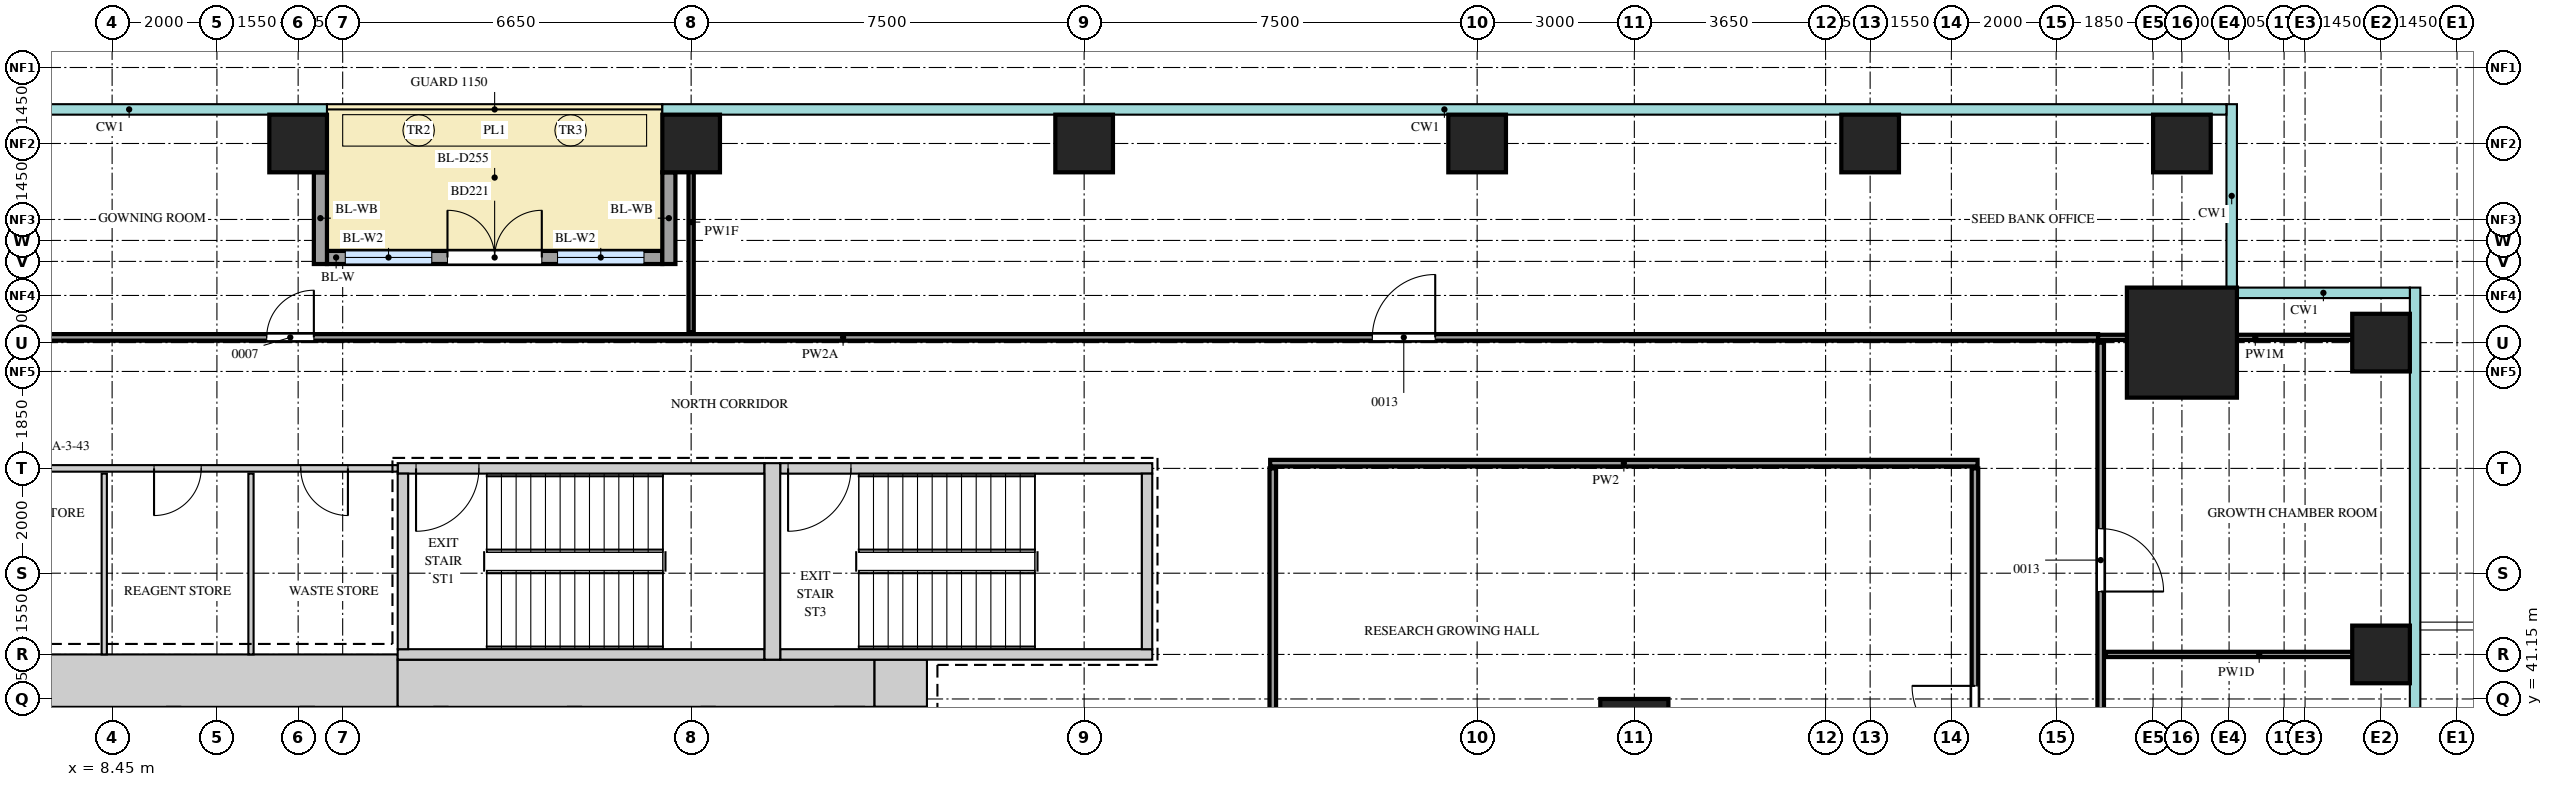
"""IFC4 building model, lengths in metres.
Left out: names, types, materials, properties, quantities, classifications, styles, units other than length and angle.
Written with IfcOpenShell. Run it as: python <this file> out.ifc"""

import sys

from ifc_helpers import new_model, si_unit, direction, frame, frame_2d, origin, origin_2d, place, context, subcontext, project, spatial, rectangle, extrude, source, transform, mapped, element, fill, save


model = new_model("IFC4")
c1 = context("Model", 3, precision=1e-05, world=origin(), true_north=direction((0.0, 1.0)))
c2 = subcontext(c1, "Body", "Model", "MODEL_VIEW")
j1 = project(units=[si_unit("LENGTHUNIT", "METRE"), si_unit("PLANEANGLEUNIT", "RADIAN")], contexts=[c1])
p1 = place(None, origin())
s1 = spatial("IfcSite", under=j1, at=p1, CompositionType="ELEMENT")
p2 = place(p1, origin())
s2 = spatial("IfcBuilding", under=s1, at=p2, CompositionType="ELEMENT")
p3 = place(p2, frame((0.0, 0.0, 105.9)))
s3 = spatial("IfcBuildingStorey", under=s2, at=p3, CompositionType="ELEMENT", Elevation=105.9)
m1 = source(origin(), c2, "Body", "SweptSolid", [
    extrude(rectangle(XDim=6.9, YDim=1.0, at=frame_2d((3.45, 0.0))), origin(), (0.0, 0.0, 1.0), 4.1),
])
p4 = place(p3, frame((7.0, 41.5, 0.0), z_axis=(0.0, 0.0, 1.0), x_axis=(1.0, 0.0, 0.0)))
e1 = element("IfcWall", 1, at=p4, inside=s3, PredefinedType="SHEAR", context=c2, shape_type="MappedRepresentation", body=[
    mapped(m1, transform((0.0, 0.0, 0.0))),
])
m2 = source(origin(), c2, "Body", "SweptSolid", [
    extrude(rectangle(XDim=9.1, YDim=0.9, at=frame_2d((4.55, 0.0))), origin(), (0.0, 0.0, 1.0), 4.1),
])
p5 = place(p3, frame((13.9, 41.45, 0.0), z_axis=(0.0, 0.0, 1.0), x_axis=(1.0, 0.0, 0.0)))
e2 = element("IfcWall", 2, at=p5, inside=s3, PredefinedType="SHEAR", context=c2, shape_type="MappedRepresentation", body=[
    mapped(m2, transform((0.0, 0.0, 0.0))),
])
m3 = source(origin(), c2, "Body", "SweptSolid", [
    extrude(rectangle(XDim=1.0, YDim=0.9, at=frame_2d((0.5, 0.0))), origin(), (0.0, 0.0, 1.0), 4.1),
])
p6 = place(p3, frame((23.0, 41.45, 0.0), z_axis=(0.0, 0.0, 1.0), x_axis=(1.0, 0.0, 0.0)))
e3 = element("IfcWall", 3, at=p6, inside=s3, PredefinedType="SHEAR", context=c2, shape_type="MappedRepresentation", body=[
    mapped(m3, transform((0.0, 0.0, 0.0))),
])
m4 = source(origin(), c2, "Body", "SweptSolid", [
    extrude(rectangle(XDim=7.0, YDim=0.2, at=frame_2d((3.5, 0.0))), origin(), (0.0, 0.0, 1.0), 4.1),
])
p7 = place(p3, frame((13.9, 45.55, 0.0), z_axis=(0.0, 0.0, 1.0), x_axis=(1.0, 0.0, 0.0)))
e4 = element("IfcWall", 4, at=p7, inside=s3, PredefinedType="SHEAR", context=c2, shape_type="MappedRepresentation", body=[
    mapped(m4, transform((0.0, 0.0, 0.0))),
])
m5 = source(origin(), c2, "Body", "SweptSolid", [
    extrude(rectangle(XDim=1.2, YDim=2.1, at=frame_2d((0.6, 1.05))), frame((0.0, 0.11, 0.0), z_axis=(0.0, -1.0, 0.0), x_axis=(1.0, 0.0, 0.0)), (0.0, 0.0, 1.0), 0.22),
])
p8 = place(p7, frame((0.35, 0.0, 0.0)))
e5 = element("IfcOpeningElement", 5, at=p8, cuts=e4, PredefinedType="OPENING", context=c2, shape_type="MappedRepresentation", body=[
    mapped(m5, transform((0.0, 0.0, 0.0))),
])
p9 = place(p3, frame((13.9, 42.0, 0.0), z_axis=(0.0, 0.0, 1.0), x_axis=(1.0, 0.0, 0.0)))
e6 = element("IfcWall", 6, at=p9, inside=s3, PredefinedType="SHEAR", context=c2, shape_type="MappedRepresentation", body=[
    mapped(m4, transform((0.0, 0.0, 0.0))),
])
m6 = source(origin(), c2, "Body", "SweptSolid", [
    extrude(rectangle(XDim=7.1, YDim=0.2, at=frame_2d((3.55, 0.0))), origin(), (0.0, 0.0, 1.0), 4.1),
])
p10 = place(p3, frame((21.2, 45.55, 0.0), z_axis=(0.0, 0.0, 1.0), x_axis=(1.0, 0.0, 0.0)))
e7 = element("IfcWall", 7, at=p10, inside=s3, PredefinedType="SHEAR", context=c2, shape_type="MappedRepresentation", body=[
    mapped(m6, transform((0.0, 0.0, 0.0))),
])
p11 = place(p10, frame((0.15, 0.0, 0.0)))
e8 = element("IfcOpeningElement", 8, at=p11, cuts=e7, PredefinedType="OPENING", context=c2, shape_type="MappedRepresentation", body=[
    mapped(m5, transform((0.0, 0.0, 0.0))),
])
p12 = place(p3, frame((21.2, 42.0, 0.0), z_axis=(0.0, 0.0, 1.0), x_axis=(1.0, 0.0, 0.0)))
e9 = element("IfcWall", 9, at=p12, inside=s3, PredefinedType="SHEAR", context=c2, shape_type="MappedRepresentation", body=[
    mapped(m6, transform((0.0, 0.0, 0.0))),
])
m7 = source(origin(), c2, "Body", "SweptSolid", [
    extrude(rectangle(XDim=3.75, YDim=0.3, at=frame_2d((1.875, 0.0))), origin(), (0.0, 0.0, 1.0), 4.1),
])
p13 = place(p3, frame((21.05, 41.9, 0.0), z_axis=(0.0, 0.0, 1.0), x_axis=(0.0, 1.0, 0.0)))
e10 = element("IfcWall", 10, at=p13, inside=s3, PredefinedType="SHEAR", context=c2, shape_type="MappedRepresentation", body=[
    mapped(m7, transform((0.0, 0.0, 0.0))),
])
m8 = source(origin(), c2, "Body", "SweptSolid", [
    extrude(rectangle(XDim=3.35, YDim=0.2, at=frame_2d((1.675, 0.0))), origin(), (0.0, 0.0, 1.0), 4.1),
])
for number, where, z_axis, x_axis in (
    (11, (14.0, 42.1, 0.0), (0.0, 0.0, 1.0), (0.0, 1.0, 0.0)),
    (12, (28.2, 42.1, 0.0), (0.0, 0.0, 1.0), (0.0, 1.0, 0.0)),
):
    element("IfcWall", number, at=place(p3, frame(where, z_axis=z_axis, x_axis=x_axis)), inside=s3, PredefinedType="SHEAR", context=c2, shape_type="MappedRepresentation", body=[
        mapped(m8, transform((0.0, 0.0, 0.0))),
    ])
m9 = source(origin(), c2, "Body", "SweptSolid", [
    extrude(rectangle(XDim=2.1, YDim=2.1, at=origin_2d()), origin(), (0.0, 0.0, 1.0), 4.4),
])
p14 = place(p3, frame((47.95, 47.95, 0.0), z_axis=(0.0, 0.0, 1.0), x_axis=(1.0, 0.0, 0.0)))
e13 = element("IfcColumn", 13, at=p14, inside=s3, PredefinedType="COLUMN", context=c2, shape_type="MappedRepresentation", body=[
    mapped(m9, transform((0.0, 0.0, 0.0))),
])
m10 = source(origin(), c2, "Body", "SweptSolid", [
    extrude(rectangle(XDim=1.1, YDim=1.1, at=origin_2d()), origin(), (0.0, 0.0, 1.0), 4.1),
])
for number, where, z_axis, x_axis in (
    (14, (51.75, 42.0, 0.0), (0.0, 0.0, 1.0), (1.0, 0.0, 0.0)),
    (15, (51.75, 47.95, 0.0), (0.0, 0.0, 1.0), (1.0, 0.0, 0.0)),
    (16, (12.0, 51.75, 0.0), (0.0, 0.0, 1.0), (1.0, 0.0, 0.0)),
    (17, (19.5, 51.75, 0.0), (0.0, 0.0, 1.0), (1.0, 0.0, 0.0)),
    (18, (27.0, 51.75, 0.0), (0.0, 0.0, 1.0), (1.0, 0.0, 0.0)),
    (19, (34.5, 51.75, 0.0), (0.0, 0.0, 1.0), (1.0, 0.0, 0.0)),
    (20, (42.0, 51.75, 0.0), (0.0, 0.0, 1.0), (1.0, 0.0, 0.0)),
    (21, (47.95, 51.75, 0.0), (0.0, 0.0, 1.0), (1.0, 0.0, 0.0)),
):
    element("IfcColumn", number, at=place(p3, frame(where, z_axis=z_axis, x_axis=x_axis)), inside=s3, PredefinedType="COLUMN", context=c2, shape_type="MappedRepresentation", body=[
        mapped(m10, transform((0.0, 0.0, 0.0))),
    ])
m11 = source(origin(), c2, "Body", "SweptSolid", [
    extrude(rectangle(XDim=1.3, YDim=1.3, at=origin_2d()), origin(), (0.0, 0.0, 1.0), 4.1),
])
p15 = place(p3, frame((37.5, 40.5, 0.0), z_axis=(0.0, 0.0, 1.0), x_axis=(1.0, 0.0, 0.0)))
e22 = element("IfcColumn", 22, at=p15, inside=s3, PredefinedType="COLUMN", context=c2, shape_type="MappedRepresentation", body=[
    mapped(m11, transform((0.0, 0.0, 0.0))),
])
m12 = source(origin(), c2, "Body", "SweptSolid", [
    extrude(rectangle(XDim=6.4, YDim=0.25, at=frame_2d((3.2, 0.0))), origin(), (0.0, 0.0, 1.0), 4.1),
])
p16 = place(p3, frame((12.55, 49.575, 0.0), z_axis=(0.0, 0.0, 1.0), x_axis=(1.0, 0.0, 0.0)))
e23 = element("IfcWall", 23, at=p16, inside=s3, PredefinedType="SOLIDWALL", context=c2, shape_type="MappedRepresentation", body=[
    mapped(m12, transform((0.0, 0.0, 0.0))),
])
m13 = source(origin(), c2, "Body", "SweptSolid", [
    extrude(rectangle(XDim=1.65, YDim=2.4, at=frame_2d((0.825, 1.2))), frame((0.0, 0.135, 0.0), z_axis=(0.0, -1.0, 0.0), x_axis=(1.0, 0.0, 0.0)), (0.0, 0.0, 1.0), 0.27),
])
p17 = place(p16, frame((0.35, 0.0, 0.0)))
e24 = element("IfcOpeningElement", 24, at=p17, cuts=e23, PredefinedType="OPENING", context=c2, shape_type="MappedRepresentation", body=[
    mapped(m13, transform((0.0, 0.0, 0.0))),
])
p18 = place(p16, frame((4.4, 0.0, 0.0)))
e25 = element("IfcOpeningElement", 25, at=p18, cuts=e23, PredefinedType="OPENING", context=c2, shape_type="MappedRepresentation", body=[
    mapped(m13, transform((0.0, 0.0, 0.0))),
])
m14 = source(origin(), c2, "Body", "SweptSolid", [
    extrude(rectangle(XDim=1.8, YDim=2.4, at=frame_2d((0.9, 1.2))), frame((0.0, 0.135, 0.0), z_axis=(0.0, -1.0, 0.0), x_axis=(1.0, 0.0, 0.0)), (0.0, 0.0, 1.0), 0.27),
])
p19 = place(p16, frame((2.3, 0.0, 0.0)))
e26 = element("IfcOpeningElement", 26, at=p19, cuts=e23, PredefinedType="OPENING", context=c2, shape_type="MappedRepresentation", body=[
    mapped(m14, transform((0.0, 0.0, 0.0))),
])
m15 = source(origin(), c2, "Body", "SweptSolid", [
    extrude(rectangle(XDim=1.75, YDim=0.25, at=frame_2d((0.875, 0.0))), origin(), (0.0, 0.0, 1.0), 3.8),
])
for number, where, z_axis, x_axis in (
    (27, (12.425, 51.2, 0.0), (0.0, 0.0, 1.0), (0.0, -1.0, 0.0)),
    (28, (19.075, 51.2, 0.0), (0.0, 0.0, 1.0), (0.0, -1.0, 0.0)),
):
    element("IfcWall", number, at=place(p3, frame(where, z_axis=z_axis, x_axis=x_axis)), inside=s3, PredefinedType="SOLIDWALL", context=c2, shape_type="MappedRepresentation", body=[
        mapped(m15, transform((0.0, 0.0, 0.0))),
    ])
m16 = source(origin(), c2, "Body", "SweptSolid", [
    extrude(rectangle(XDim=37.65, YDim=0.125, at=frame_2d((18.825, 0.0))), origin(), (0.0, 0.0, 1.0), 4.2),
])
p20 = place(p3, frame((46.4, 10.3, 0.0), z_axis=(0.0, 0.0, 1.0), x_axis=(0.0, 1.0, 0.0)))
e29 = element("IfcWall", 29, at=p20, inside=s3, PredefinedType="PARTITIONING", context=c2, shape_type="MappedRepresentation", body=[
    mapped(m16, transform((0.0, 0.0, 0.0))),
])
m17 = source(origin(), c2, "Body", "SweptSolid", [
    extrude(rectangle(XDim=1.2, YDim=2.1, at=frame_2d((0.6, 1.05))), frame((0.0, 0.073, 0.0), z_axis=(0.0, -1.0, 0.0), x_axis=(1.0, 0.0, 0.0)), (0.0, 0.0, 1.0), 0.145),
])
p21 = place(p20, frame((7.85, 0.0, 0.0)))
e30 = element("IfcOpeningElement", 30, at=p21, cuts=e29, PredefinedType="OPENING", context=c2, shape_type="MappedRepresentation", body=[
    mapped(m17, transform((0.0, 0.0, 0.0))),
])
p22 = place(p20, frame((23.6, 0.0, 0.0)))
e31 = element("IfcOpeningElement", 31, at=p22, cuts=e29, PredefinedType="OPENING", context=c2, shape_type="MappedRepresentation", body=[
    mapped(m17, transform((0.0, 0.0, 0.0))),
])
p23 = place(p20, frame((32.9, 0.0, 0.0)))
e32 = element("IfcOpeningElement", 32, at=p23, cuts=e29, PredefinedType="OPENING", context=c2, shape_type="MappedRepresentation", body=[
    mapped(m17, transform((0.0, 0.0, 0.0))),
])
m18 = source(origin(), c2, "Body", "SweptSolid", [
    extrude(rectangle(XDim=32.85, YDim=0.125, at=frame_2d((16.425, 0.0))), origin(), (0.0, 0.0, 1.0), 4.2),
])
p24 = place(p3, frame((44.0, 12.7, 0.0), z_axis=(0.0, 0.0, 1.0), x_axis=(0.0, 1.0, 0.0)))
e33 = element("IfcWall", 33, at=p24, inside=s3, PredefinedType="PARTITIONING", context=c2, shape_type="MappedRepresentation", body=[
    mapped(m18, transform((0.0, 0.0, 0.0))),
])
p25 = place(p24, frame((9.2, 0.0, 0.0)))
e34 = element("IfcOpeningElement", 34, at=p25, cuts=e33, PredefinedType="OPENING", context=c2, shape_type="MappedRepresentation", body=[
    mapped(m17, transform((0.0, 0.0, 0.0))),
])
p26 = place(p24, frame((27.5, 0.0, 0.0)))
e35 = element("IfcOpeningElement", 35, at=p26, cuts=e33, PredefinedType="OPENING", context=c2, shape_type="MappedRepresentation", body=[
    mapped(m17, transform((0.0, 0.0, 0.0))),
])
m19 = source(origin(), c2, "Body", "SweptSolid", [
    extrude(rectangle(XDim=9.45, YDim=0.125, at=frame_2d((4.725, 0.0))), origin(), (0.0, 0.0, 1.0), 4.2),
])
p27 = place(p3, frame((30.6, 36.1, 0.0), z_axis=(0.0, 0.0, 1.0), x_axis=(0.0, 1.0, 0.0)))
e36 = element("IfcWall", 36, at=p27, inside=s3, PredefinedType="PARTITIONING", context=c2, shape_type="MappedRepresentation", body=[
    mapped(m19, transform((0.0, 0.0, 0.0))),
])
m20 = source(origin(), c2, "Body", "SweptSolid", [
    extrude(rectangle(XDim=3.45, YDim=0.1, at=frame_2d((1.725, 0.0))), origin(), (0.0, 0.0, 1.0), 4.2),
])
for number, where, z_axis, x_axis in (
    (37, (8.3, 42.0, 0.0), (0.0, 0.0, 1.0), (0.0, 1.0, 0.0)),
    (38, (11.1, 42.0, 0.0), (0.0, 0.0, 1.0), (0.0, 1.0, 0.0)),
):
    element("IfcWall", number, at=place(p3, frame(where, z_axis=z_axis, x_axis=x_axis)), inside=s3, PredefinedType="PARTITIONING", context=c2, shape_type="MappedRepresentation", body=[
        mapped(m20, transform((0.0, 0.0, 0.0))),
    ])
m21 = source(origin(), c2, "Body", "SweptSolid", [
    extrude(rectangle(XDim=5.85, YDim=0.1, at=frame_2d((2.925, 0.0))), origin(), (0.0, 0.0, 1.0), 4.2),
])
p28 = place(p3, frame((46.5, 42.0, 0.0), z_axis=(0.0, 0.0, 1.0), x_axis=(1.0, 0.0, 0.0)))
e39 = element("IfcWall", 39, at=p28, inside=s3, PredefinedType="PARTITIONING", context=c2, shape_type="MappedRepresentation", body=[
    mapped(m21, transform((0.0, 0.0, 0.0))),
])
m22 = source(origin(), c2, "Body", "SweptSolid", [
    extrude(rectangle(XDim=7.95, YDim=0.125, at=frame_2d((3.975, 0.0))), origin(), (0.0, 0.0, 1.0), 4.2),
])
p29 = place(p3, frame((5.95, 45.55, 0.0), z_axis=(0.0, 0.0, 1.0), x_axis=(1.0, 0.0, 0.0)))
e40 = element("IfcWall", 40, at=p29, inside=s3, PredefinedType="PARTITIONING", context=c2, shape_type="MappedRepresentation", body=[
    mapped(m22, transform((0.0, 0.0, 0.0))),
])
m23 = source(origin(), c2, "Body", "SweptSolid", [
    extrude(rectangle(XDim=0.9, YDim=2.1, at=frame_2d((0.45, 1.05))), frame((0.0, 0.073, 0.0), z_axis=(0.0, -1.0, 0.0), x_axis=(1.0, 0.0, 0.0)), (0.0, 0.0, 1.0), 0.145),
])
p30 = place(p29, frame((3.3, 0.0, 0.0)))
e41 = element("IfcOpeningElement", 41, at=p30, cuts=e40, PredefinedType="OPENING", context=c2, shape_type="MappedRepresentation", body=[
    mapped(m23, transform((0.0, 0.0, 0.0))),
])
p31 = place(p29, frame((6.1, 0.0, 0.0)))
e42 = element("IfcOpeningElement", 42, at=p31, cuts=e40, PredefinedType="OPENING", context=c2, shape_type="MappedRepresentation", body=[
    mapped(m23, transform((0.0, 0.0, 0.0))),
])
m24 = source(origin(), c2, "Body", "SweptSolid", [
    extrude(rectangle(XDim=13.5, YDim=0.125, at=frame_2d((6.75, 0.0))), origin(), (0.0, 0.0, 1.0), 4.2),
])
p32 = place(p3, frame((30.55, 45.65, 0.0), z_axis=(0.0, 0.0, 1.0), x_axis=(1.0, 0.0, 0.0)))
e43 = element("IfcWall", 43, at=p32, inside=s3, PredefinedType="PARTITIONING", context=c2, shape_type="MappedRepresentation", body=[
    mapped(m24, transform((0.0, 0.0, 0.0))),
])
m25 = source(origin(), c2, "Body", "SweptSolid", [
    extrude(rectangle(XDim=42.2, YDim=0.125, at=frame_2d((21.1, 0.0))), origin(), (0.0, 0.0, 1.0), 3.55),
])
p33 = place(p3, frame((4.15, 48.05, 0.0), z_axis=(0.0, 0.0, 1.0), x_axis=(1.0, 0.0, 0.0)))
e44 = element("IfcWall", 44, at=p33, inside=s3, PredefinedType="PARTITIONING", context=c2, shape_type="MappedRepresentation", body=[
    mapped(m25, transform((0.0, 0.0, 0.0))),
])
p34 = place(p33, frame((7.25, 0.0, 0.0)))
e45 = element("IfcOpeningElement", 45, at=p34, cuts=e44, PredefinedType="OPENING", context=c2, shape_type="MappedRepresentation", body=[
    mapped(m23, transform((0.0, 0.0, 0.0))),
])
p35 = place(p33, frame((28.35, 0.0, 0.0)))
e46 = element("IfcOpeningElement", 46, at=p35, cuts=e44, PredefinedType="OPENING", context=c2, shape_type="MappedRepresentation", body=[
    mapped(m17, transform((0.0, 0.0, 0.0))),
])
m26 = source(origin(), c2, "Body", "SweptSolid", [
    extrude(rectangle(XDim=6.0, YDim=0.1, at=frame_2d((3.0, 0.0))), origin(), (0.0, 0.0, 1.0), 3.55),
])
p36 = place(p3, frame((46.35, 48.05, 0.0), z_axis=(0.0, 0.0, 1.0), x_axis=(1.0, 0.0, 0.0)))
e47 = element("IfcWall", 47, at=p36, inside=s3, PredefinedType="PARTITIONING", context=c2, shape_type="MappedRepresentation", body=[
    mapped(m26, transform((0.0, 0.0, 0.0))),
])
m27 = source(origin(), c2, "Body", "SweptSolid", [
    extrude(rectangle(XDim=4.2, YDim=0.1, at=frame_2d((2.1, 0.0))), origin(), (0.0, 0.0, 1.0), 3.77),
])
p37 = place(p3, frame((19.5, 48.15, 0.0), z_axis=(0.0, 0.0, 1.0), x_axis=(0.0, 1.0, 0.0)))
e48 = element("IfcWall", 48, at=p37, inside=s3, PredefinedType="PARTITIONING", context=c2, shape_type="MappedRepresentation", body=[
    mapped(m27, transform((0.0, 0.0, 0.0))),
])
m28 = source(origin(), c2, "Body", "SweptSolid", [
    extrude(rectangle(XDim=1.65, YDim=2.4, at=frame_2d((0.825, 1.2))), frame((0.0, 0.03, 0.0), z_axis=(0.0, -1.0, 0.0), x_axis=(1.0, 0.0, 0.0)), (0.0, 0.0, 1.0), 0.06),
])
p38 = place(p17, origin())
e49 = element("IfcWindow", 49, at=p38, inside=s3, PartitioningType="SINGLE_PANEL", PredefinedType="WINDOW", context=c2, shape_type="MappedRepresentation", body=[
    mapped(m28, transform((0.0, 0.0, 0.0))),
])
fill(e24, e49)
p39 = place(p18, origin())
e50 = element("IfcWindow", 50, at=p39, inside=s3, PartitioningType="SINGLE_PANEL", PredefinedType="WINDOW", context=c2, shape_type="MappedRepresentation", body=[
    mapped(m28, transform((0.0, 0.0, 0.0))),
])
fill(e25, e50)
m29 = source(origin(), c2, "Body", "SweptSolid", [
    extrude(rectangle(XDim=1.8, YDim=2.4, at=frame_2d((0.9, 1.2))), frame((0.0, 0.025, 0.0), z_axis=(0.0, -1.0, 0.0), x_axis=(1.0, 0.0, 0.0)), (0.0, 0.0, 1.0), 0.05),
])
p40 = place(p19, origin())
e51 = element("IfcDoor", 51, at=p40, inside=s3, OperationType="DOUBLE_DOOR_DOUBLE_SWING", PredefinedType="DOOR", context=c2, shape_type="MappedRepresentation", body=[
    mapped(m29, transform((0.0, 0.0, 0.0))),
])
fill(e26, e51)
m30 = source(origin(), c2, "Body", "SweptSolid", [
    extrude(rectangle(XDim=1.2, YDim=2.1, at=frame_2d((0.6, 1.05))), frame((0.0, 0.025, 0.0), z_axis=(0.0, -1.0, 0.0), x_axis=(1.0, 0.0, 0.0)), (0.0, 0.0, 1.0), 0.05),
])
p41 = place(p26, origin())
e52 = element("IfcDoor", 52, at=p41, inside=s3, OperationType="SINGLE_SWING_LEFT", PredefinedType="DOOR", context=c2, shape_type="MappedRepresentation", body=[
    mapped(m30, transform((0.0, 0.0, 0.0))),
])
fill(e35, e52)
p42 = place(p23, origin())
e53 = element("IfcDoor", 53, at=p42, inside=s3, OperationType="SINGLE_SWING_LEFT", PredefinedType="DOOR", context=c2, shape_type="MappedRepresentation", body=[
    mapped(m30, transform((0.0, 0.0, 0.0))),
])
fill(e32, e53)
m31 = source(origin(), c2, "Body", "SweptSolid", [
    extrude(rectangle(XDim=0.9, YDim=2.1, at=frame_2d((0.45, 1.05))), frame((0.0, 0.025, 0.0), z_axis=(0.0, -1.0, 0.0), x_axis=(1.0, 0.0, 0.0)), (0.0, 0.0, 1.0), 0.05),
])
p43 = place(p34, origin())
e54 = element("IfcDoor", 54, at=p43, inside=s3, OperationType="SINGLE_SWING_LEFT", PredefinedType="DOOR", context=c2, shape_type="MappedRepresentation", body=[
    mapped(m31, transform((0.0, 0.0, 0.0))),
])
fill(e45, e54)
p44 = place(p35, origin())
e55 = element("IfcDoor", 55, at=p44, inside=s3, OperationType="SINGLE_SWING_LEFT", PredefinedType="DOOR", context=c2, shape_type="MappedRepresentation", body=[
    mapped(m30, transform((0.0, 0.0, 0.0))),
])
fill(e46, e55)
p45 = place(p30, origin())
e56 = element("IfcDoor", 56, at=p45, inside=s3, OperationType="SINGLE_SWING_LEFT", PredefinedType="DOOR", context=c2, shape_type="MappedRepresentation", body=[
    mapped(m31, transform((0.0, 0.0, 0.0))),
])
fill(e41, e56)
p46 = place(p31, origin())
e57 = element("IfcDoor", 57, at=p46, inside=s3, OperationType="SINGLE_SWING_RIGHT", PredefinedType="DOOR", context=c2, shape_type="MappedRepresentation", body=[
    mapped(m31, transform((0.0, 0.0, 0.0))),
])
fill(e42, e57)
p47 = place(p8, origin())
e58 = element("IfcDoor", 58, at=p47, inside=s3, OperationType="SINGLE_SWING_LEFT", PredefinedType="DOOR", context=c2, shape_type="MappedRepresentation", body=[
    mapped(m30, transform((0.0, 0.0, 0.0))),
])
fill(e5, e58)
p48 = place(p11, origin())
e59 = element("IfcDoor", 59, at=p48, inside=s3, OperationType="SINGLE_SWING_LEFT", PredefinedType="DOOR", context=c2, shape_type="MappedRepresentation", body=[
    mapped(m30, transform((0.0, 0.0, 0.0))),
])
fill(e8, e59)
save(model, sys.argv[1])
